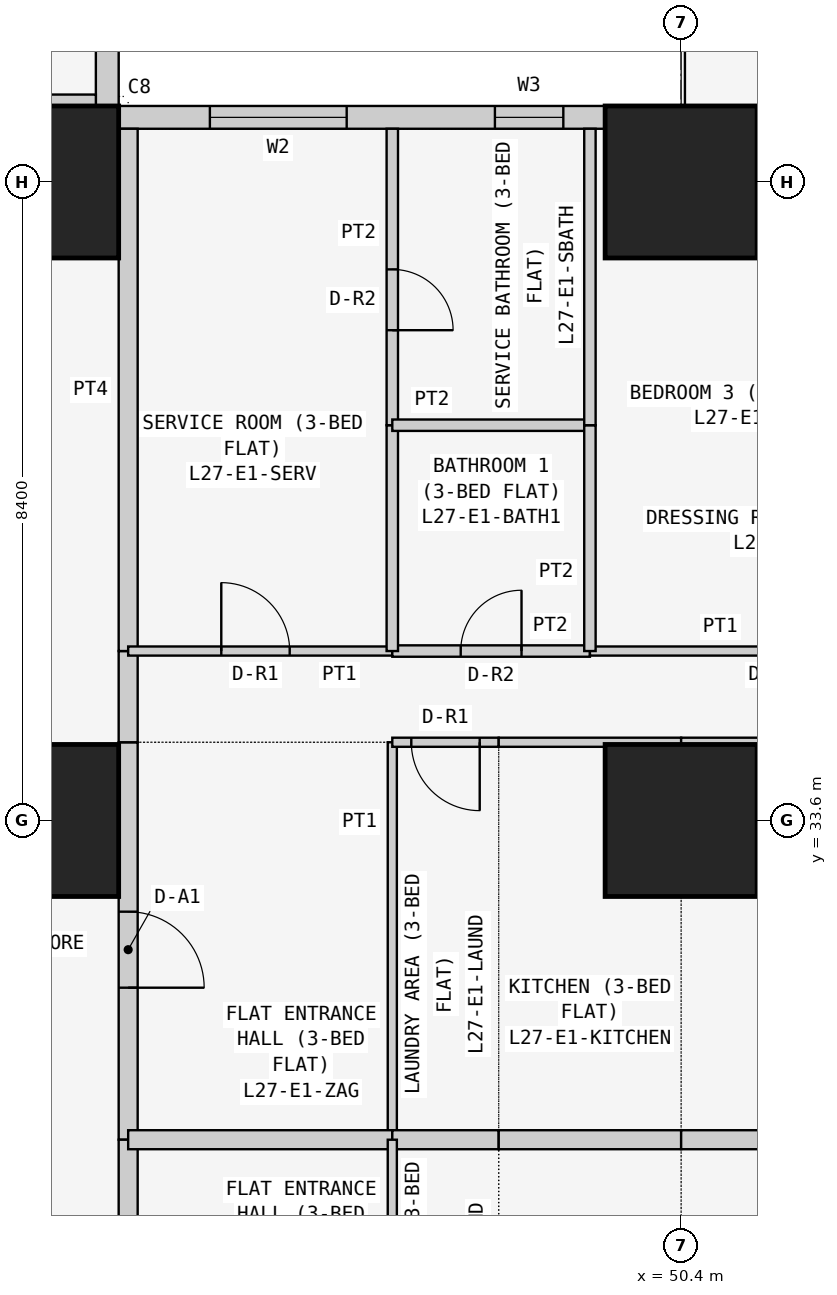
"""IFC4 building model, lengths in metres.
Left out: names, types, materials, properties, quantities, classifications, styles, units other than length and angle.
Written with IfcOpenShell. Run it as: python <this file> out.ifc"""

import sys

from ifc_helpers import new_model, si_unit, direction, frame, frame_2d, origin, origin_2d, place, context, subcontext, project, spatial, rectangle, extrude, element, fill, save


model = new_model("IFC4")
c1 = context("Model", 3, precision=1e-05, world=origin(), true_north=direction((0.0, 1.0)))
c2 = subcontext(c1, "Body", "Model", "MODEL_VIEW")
j1 = project(units=[si_unit("LENGTHUNIT", "METRE"), si_unit("PLANEANGLEUNIT", "RADIAN")], contexts=[c1])
p1 = place(None, origin())
s1 = spatial("IfcSite", under=j1, at=p1, CompositionType="ELEMENT")
p2 = place(p1, origin())
s2 = spatial("IfcBuilding", under=s1, at=p2, CompositionType="ELEMENT")
p3 = place(p2, frame((0.0, 0.0, 108.9)))
s3 = spatial("IfcBuildingStorey", under=s2, at=p3, CompositionType="ELEMENT", Elevation=108.9)
for number, where, z_axis, x_axis in (
    (1, (42.0, 33.6, 0.0), (0.0, 0.0, 1.0), (1.0, 0.0, 0.0)),
    (2, (42.0, 42.0, 0.0), (0.0, 0.0, 1.0), (1.0, 0.0, 0.0)),
    (3, (50.4, 33.6, 0.0), (0.0, 0.0, 1.0), (1.0, 0.0, 0.0)),
    (4, (50.4, 42.0, 0.0), (0.0, 0.0, 1.0), (1.0, 0.0, 0.0)),
):
    element("IfcColumn", number, at=place(p3, frame(where, z_axis=z_axis, x_axis=x_axis)), inside=s3, PredefinedType="COLUMN", context=c2, shape_type="SweptSolid", body=[
        extrude(rectangle(XDim=2.0, YDim=2.0, at=origin_2d()), origin(), (0.0, 0.0, 1.0), 3.6),
    ])
p4 = place(p3, frame((58.4, 42.85, 0.0), z_axis=(0.0, 0.0, 1.0), x_axis=(-1.0, 0.0, 0.0)))
e5 = element("IfcWall", 5, at=p4, inside=s3, PredefinedType="SOLIDWALL", context=c2, shape_type="SweptSolid", body=[
    extrude(rectangle(XDim=15.7, YDim=0.3, at=frame_2d((7.85, 0.0))), origin(), (0.0, 0.0, 1.0), 3.45),
])
p5 = place(p4, frame((12.4, 0.0, 0.9)))
e6 = element("IfcOpeningElement", 6, at=p5, cuts=e5, PredefinedType="OPENING", context=c2, shape_type="SweptSolid", body=[
    extrude(rectangle(XDim=1.8, YDim=1.5, at=frame_2d((0.9, 0.75))), frame((0.0, 0.16, 0.0), z_axis=(0.0, -1.0, 0.0), x_axis=(1.0, 0.0, 0.0)), (0.0, 0.0, 1.0), 0.32),
])
p6 = place(p4, frame((9.55, 0.0, 1.5)))
e7 = element("IfcOpeningElement", 7, at=p6, cuts=e5, PredefinedType="OPENING", context=c2, shape_type="SweptSolid", body=[
    extrude(rectangle(XDim=0.9, YDim=0.7, at=frame_2d((0.45, 0.35))), frame((0.0, 0.16, 0.0), z_axis=(0.0, -1.0, 0.0), x_axis=(1.0, 0.0, 0.0)), (0.0, 0.0, 1.0), 0.32),
])
p7 = place(p4, frame((5.1, 0.0, 0.9)))
e8 = element("IfcOpeningElement", 8, at=p7, cuts=e5, PredefinedType="OPENING", context=c2, shape_type="SweptSolid", body=[
    extrude(rectangle(XDim=1.8, YDim=1.5, at=frame_2d((0.9, 0.75))), frame((0.0, 0.16, 0.0), z_axis=(0.0, -1.0, 0.0), x_axis=(1.0, 0.0, 0.0)), (0.0, 0.0, 1.0), 0.32),
])
p8 = place(p4, frame((2.0, 0.0, 0.0)))
e9 = element("IfcOpeningElement", 9, at=p8, cuts=e5, PredefinedType="OPENING", context=c2, shape_type="SweptSolid", body=[
    extrude(rectangle(XDim=0.9, YDim=2.4, at=frame_2d((0.45, 1.2))), frame((0.0, 0.16, 0.0), z_axis=(0.0, -1.0, 0.0), x_axis=(1.0, 0.0, 0.0)), (0.0, 0.0, 1.0), 0.32),
])
p9 = place(p4, frame((0.7, 0.0, 0.9)))
e10 = element("IfcOpeningElement", 10, at=p9, cuts=e5, PredefinedType="OPENING", context=c2, shape_type="SweptSolid", body=[
    extrude(rectangle(XDim=1.2, YDim=1.5, at=frame_2d((0.6, 0.75))), frame((0.0, 0.16, 0.0), z_axis=(0.0, -1.0, 0.0), x_axis=(1.0, 0.0, 0.0)), (0.0, 0.0, 1.0), 0.32),
])
p10 = place(p3, frame((42.85, 43.0, 0.0), z_axis=(0.0, 0.0, 1.0), x_axis=(0.0, 1.0, 0.0)))
e11 = element("IfcWall", 11, at=p10, inside=s3, PredefinedType="SOLIDWALL", context=c2, shape_type="SweptSolid", body=[
    extrude(rectangle(XDim=7.0, YDim=0.3, at=frame_2d((3.5, 0.0))), origin(), (0.0, 0.0, 1.0), 3.45),
])
p11 = place(p10, frame((1.5, 0.0, 0.9)))
e12 = element("IfcOpeningElement", 12, at=p11, cuts=e11, PredefinedType="OPENING", context=c2, shape_type="SweptSolid", body=[
    extrude(rectangle(XDim=2.4, YDim=1.5, at=frame_2d((1.2, 0.75))), frame((0.0, 0.16, 0.0), z_axis=(0.0, -1.0, 0.0), x_axis=(1.0, 0.0, 0.0)), (0.0, 0.0, 1.0), 0.32),
])
p12 = place(p10, frame((5.05, 0.0, 0.9)))
e13 = element("IfcOpeningElement", 13, at=p12, cuts=e11, PredefinedType="OPENING", context=c2, shape_type="SweptSolid", body=[
    extrude(rectangle(XDim=1.2, YDim=1.5, at=frame_2d((0.6, 0.75))), frame((0.0, 0.16, 0.0), z_axis=(0.0, -1.0, 0.0), x_axis=(1.0, 0.0, 0.0)), (0.0, 0.0, 1.0), 0.32),
])
p13 = place(p3, frame((31.143, 43.075, 0.0), z_axis=(0.0, 0.0, 1.0), x_axis=(1.0, 0.0, 0.0)))
e14 = element("IfcWall", 14, at=p13, inside=s3, PredefinedType="PARTITIONING", context=c2, shape_type="SweptSolid", body=[
    extrude(rectangle(XDim=11.557, YDim=0.15, at=frame_2d((5.778, 0.0))), origin(), (0.0, 0.0, 1.0), 3.45),
])
p14 = place(p3, frame((43.125, 34.629, 0.0), z_axis=(0.0, 0.0, 1.0), x_axis=(0.0, -1.0, 0.0)))
e15 = element("IfcWall", 15, at=p14, inside=s3, PredefinedType="PARTITIONING", context=c2, shape_type="SweptSolid", body=[
    extrude(rectangle(XDim=5.229, YDim=0.25, at=frame_2d((2.615, 0.0))), origin(), (0.0, 0.0, 1.0), 3.45),
])
p15 = place(p14, frame((2.229, 0.0, 0.0)))
e16 = element("IfcOpeningElement", 16, at=p15, cuts=e15, PredefinedType="OPENING", context=c2, shape_type="SweptSolid", body=[
    extrude(rectangle(XDim=1.0, YDim=2.1, at=frame_2d((0.5, 1.05))), frame((0.0, 0.135, 0.0), z_axis=(0.0, -1.0, 0.0), x_axis=(1.0, 0.0, 0.0)), (0.0, 0.0, 1.0), 0.27),
])
p16 = place(p3, frame((43.125, 35.829, 0.0), z_axis=(0.0, 0.0, 1.0), x_axis=(0.0, -1.0, 0.0)))
e17 = element("IfcWall", 17, at=p16, inside=s3, PredefinedType="PARTITIONING", context=c2, shape_type="SweptSolid", body=[
    extrude(rectangle(XDim=1.2, YDim=0.25, at=frame_2d((0.6, 0.0))), origin(), (0.0, 0.0, 1.0), 3.45),
])
p17 = place(p3, frame((43.125, 42.7, 0.0), z_axis=(0.0, 0.0, 1.0), x_axis=(0.0, -1.0, 0.0)))
e18 = element("IfcWall", 18, at=p17, inside=s3, PredefinedType="PARTITIONING", context=c2, shape_type="SweptSolid", body=[
    extrude(rectangle(XDim=6.871, YDim=0.25, at=frame_2d((3.436, 0.0))), origin(), (0.0, 0.0, 1.0), 3.45),
])
p18 = place(p3, frame((43.125, 29.4, 0.0), z_axis=(0.0, 0.0, 1.0), x_axis=(0.0, -1.0, 0.0)))
e19 = element("IfcWall", 19, at=p18, inside=s3, PredefinedType="PARTITIONING", context=c2, shape_type="SweptSolid", body=[
    extrude(rectangle(XDim=5.229, YDim=0.25, at=frame_2d((2.615, 0.0))), origin(), (0.0, 0.0, 1.0), 3.45),
])
p19 = place(p18, frame((2.05, 0.0, 0.0)))
e20 = element("IfcOpeningElement", 20, at=p19, cuts=e19, PredefinedType="OPENING", context=c2, shape_type="SweptSolid", body=[
    extrude(rectangle(XDim=1.0, YDim=2.1, at=frame_2d((0.5, 1.05))), frame((0.0, 0.135, 0.0), z_axis=(0.0, -1.0, 0.0), x_axis=(1.0, 0.0, 0.0)), (0.0, 0.0, 1.0), 0.27),
])
p20 = place(p3, frame((46.6, 29.4, 0.0), z_axis=(0.0, 0.0, 1.0), x_axis=(0.0, 1.0, 0.0)))
e21 = element("IfcWall", 21, at=p20, inside=s3, PredefinedType="PARTITIONING", context=c2, shape_type="SweptSolid", body=[
    extrude(rectangle(XDim=5.229, YDim=0.12, at=frame_2d((2.615, 0.0))), origin(), (0.0, 0.0, 1.0), 3.45),
])
p21 = place(p3, frame((43.125, 29.4, 0.0), z_axis=(0.0, 0.0, 1.0), x_axis=(1.0, 0.0, 0.0)))
e22 = element("IfcWall", 22, at=p21, inside=s3, PredefinedType="PARTITIONING", context=c2, shape_type="SweptSolid", body=[
    extrude(rectangle(XDim=3.475, YDim=0.25, at=frame_2d((1.738, 0.0))), origin(), (0.0, 0.0, 1.0), 3.45),
])
p22 = place(p3, frame((48.0, 34.629, 0.0), z_axis=(0.0, 0.0, 1.0), x_axis=(-1.0, 0.0, 0.0)))
e23 = element("IfcWall", 23, at=p22, inside=s3, PredefinedType="PARTITIONING", context=c2, shape_type="SweptSolid", body=[
    extrude(rectangle(XDim=1.4, YDim=0.12, at=frame_2d((0.7, 0.0))), origin(), (0.0, 0.0, 1.0), 3.45),
])
p23 = place(p22, frame((0.25, 0.0, 0.0)))
e24 = element("IfcOpeningElement", 24, at=p23, cuts=e23, PredefinedType="OPENING", context=c2, shape_type="SweptSolid", body=[
    extrude(rectangle(XDim=0.9, YDim=2.1, at=frame_2d((0.45, 1.05))), frame((0.0, 0.07, 0.0), z_axis=(0.0, -1.0, 0.0), x_axis=(1.0, 0.0, 0.0)), (0.0, 0.0, 1.0), 0.14),
])
p24 = place(p3, frame((46.6, 29.4, 0.0), z_axis=(0.0, 0.0, 1.0), x_axis=(1.0, 0.0, 0.0)))
e25 = element("IfcWall", 25, at=p24, inside=s3, PredefinedType="PARTITIONING", context=c2, shape_type="SweptSolid", body=[
    extrude(rectangle(XDim=1.4, YDim=0.25, at=frame_2d((0.7, 0.0))), origin(), (0.0, 0.0, 1.0), 3.45),
])
p25 = place(p3, frame((50.4, 34.629, 0.0), z_axis=(0.0, 0.0, 1.0), x_axis=(-1.0, 0.0, 0.0)))
e26 = element("IfcWall", 26, at=p25, inside=s3, PredefinedType="PARTITIONING", context=c2, shape_type="SweptSolid", body=[
    extrude(rectangle(XDim=2.4, YDim=0.12, at=frame_2d((1.2, 0.0))), origin(), (0.0, 0.0, 1.0), 3.45),
])
p26 = place(p3, frame((48.0, 29.4, 0.0), z_axis=(0.0, 0.0, 1.0), x_axis=(1.0, 0.0, 0.0)))
e27 = element("IfcWall", 27, at=p26, inside=s3, PredefinedType="PARTITIONING", context=c2, shape_type="SweptSolid", body=[
    extrude(rectangle(XDim=2.4, YDim=0.25, at=frame_2d((1.2, 0.0))), origin(), (0.0, 0.0, 1.0), 3.45),
])
p27 = place(p3, frame((55.3, 34.629, 0.0), z_axis=(0.0, 0.0, 1.0), x_axis=(-1.0, 0.0, 0.0)))
e28 = element("IfcWall", 28, at=p27, inside=s3, PredefinedType="PARTITIONING", context=c2, shape_type="SweptSolid", body=[
    extrude(rectangle(XDim=4.9, YDim=0.12, at=frame_2d((2.45, 0.0))), origin(), (0.0, 0.0, 1.0), 3.45),
])
p28 = place(p27, frame((1.25, 0.0, 0.0)))
e29 = element("IfcOpeningElement", 29, at=p28, cuts=e28, PredefinedType="OPENING", context=c2, shape_type="SweptSolid", body=[
    extrude(rectangle(XDim=0.9, YDim=2.1, at=frame_2d((0.45, 1.05))), frame((0.0, 0.07, 0.0), z_axis=(0.0, -1.0, 0.0), x_axis=(1.0, 0.0, 0.0)), (0.0, 0.0, 1.0), 0.14),
])
p29 = place(p3, frame((50.4, 29.4, 0.0), z_axis=(0.0, 0.0, 1.0), x_axis=(1.0, 0.0, 0.0)))
e30 = element("IfcWall", 30, at=p29, inside=s3, PredefinedType="PARTITIONING", context=c2, shape_type="SweptSolid", body=[
    extrude(rectangle(XDim=9.05, YDim=0.25, at=frame_2d((4.525, 0.0))), origin(), (0.0, 0.0, 1.0), 3.45),
])
p30 = place(p3, frame((46.6, 35.829, 0.0), z_axis=(0.0, 0.0, 1.0), x_axis=(-1.0, 0.0, 0.0)))
e31 = element("IfcWall", 31, at=p30, inside=s3, PredefinedType="PARTITIONING", context=c2, shape_type="SweptSolid", body=[
    extrude(rectangle(XDim=3.475, YDim=0.12, at=frame_2d((1.738, 0.0))), origin(), (0.0, 0.0, 1.0), 3.45),
])
p31 = place(p30, frame((1.35, 0.0, 0.0)))
e32 = element("IfcOpeningElement", 32, at=p31, cuts=e31, PredefinedType="OPENING", context=c2, shape_type="SweptSolid", body=[
    extrude(rectangle(XDim=0.9, YDim=2.1, at=frame_2d((0.45, 1.05))), frame((0.0, 0.07, 0.0), z_axis=(0.0, -1.0, 0.0), x_axis=(1.0, 0.0, 0.0)), (0.0, 0.0, 1.0), 0.14),
])
p32 = place(p3, frame((49.2, 35.829, 0.0), z_axis=(0.0, 0.0, 1.0), x_axis=(-1.0, 0.0, 0.0)))
e33 = element("IfcWall", 33, at=p32, inside=s3, PredefinedType="PARTITIONING", context=c2, shape_type="SweptSolid", body=[
    extrude(rectangle(XDim=2.6, YDim=0.15, at=frame_2d((1.3, 0.0))), origin(), (0.0, 0.0, 1.0), 3.45),
])
p33 = place(p32, frame((0.9, 0.0, 0.0)))
e34 = element("IfcOpeningElement", 34, at=p33, cuts=e33, PredefinedType="OPENING", context=c2, shape_type="SweptSolid", body=[
    extrude(rectangle(XDim=0.8, YDim=2.1, at=frame_2d((0.4, 1.05))), frame((0.0, 0.085, 0.0), z_axis=(0.0, -1.0, 0.0), x_axis=(1.0, 0.0, 0.0)), (0.0, 0.0, 1.0), 0.17),
])
p34 = place(p3, frame((54.1, 35.829, 0.0), z_axis=(0.0, 0.0, 1.0), x_axis=(-1.0, 0.0, 0.0)))
e35 = element("IfcWall", 35, at=p34, inside=s3, PredefinedType="PARTITIONING", context=c2, shape_type="SweptSolid", body=[
    extrude(rectangle(XDim=4.9, YDim=0.12, at=frame_2d((2.45, 0.0))), origin(), (0.0, 0.0, 1.0), 3.45),
])
p35 = place(p34, frame((1.65, 0.0, 0.0)))
e36 = element("IfcOpeningElement", 36, at=p35, cuts=e35, PredefinedType="OPENING", context=c2, shape_type="SweptSolid", body=[
    extrude(rectangle(XDim=0.9, YDim=2.1, at=frame_2d((0.45, 1.05))), frame((0.0, 0.07, 0.0), z_axis=(0.0, -1.0, 0.0), x_axis=(1.0, 0.0, 0.0)), (0.0, 0.0, 1.0), 0.14),
])
p36 = place(p3, frame((46.6, 35.829, 0.0), z_axis=(0.0, 0.0, 1.0), x_axis=(0.0, 1.0, 0.0)))
e37 = element("IfcWall", 37, at=p36, inside=s3, PredefinedType="PARTITIONING", context=c2, shape_type="SweptSolid", body=[
    extrude(rectangle(XDim=2.971, YDim=0.15, at=frame_2d((1.485, 0.0))), origin(), (0.0, 0.0, 1.0), 3.45),
])
p37 = place(p3, frame((46.6, 38.8, 0.0), z_axis=(0.0, 0.0, 1.0), x_axis=(0.0, 1.0, 0.0)))
e38 = element("IfcWall", 38, at=p37, inside=s3, PredefinedType="PARTITIONING", context=c2, shape_type="SweptSolid", body=[
    extrude(rectangle(XDim=3.9, YDim=0.15, at=frame_2d((1.95, 0.0))), origin(), (0.0, 0.0, 1.0), 3.45),
])
p38 = place(p37, frame((1.25, 0.0, 0.0)))
e39 = element("IfcOpeningElement", 39, at=p38, cuts=e38, PredefinedType="OPENING", context=c2, shape_type="SweptSolid", body=[
    extrude(rectangle(XDim=0.8, YDim=2.1, at=frame_2d((0.4, 1.05))), frame((0.0, 0.085, 0.0), z_axis=(0.0, -1.0, 0.0), x_axis=(1.0, 0.0, 0.0)), (0.0, 0.0, 1.0), 0.17),
])
p39 = place(p3, frame((49.2, 38.8, 0.0), z_axis=(0.0, 0.0, 1.0), x_axis=(-1.0, 0.0, 0.0)))
e40 = element("IfcWall", 40, at=p39, inside=s3, PredefinedType="PARTITIONING", context=c2, shape_type="SweptSolid", body=[
    extrude(rectangle(XDim=2.6, YDim=0.15, at=frame_2d((1.3, 0.0))), origin(), (0.0, 0.0, 1.0), 3.45),
])
p40 = place(p3, frame((49.2, 35.829, 0.0), z_axis=(0.0, 0.0, 1.0), x_axis=(0.0, 1.0, 0.0)))
e41 = element("IfcWall", 41, at=p40, inside=s3, PredefinedType="PARTITIONING", context=c2, shape_type="SweptSolid", body=[
    extrude(rectangle(XDim=2.971, YDim=0.15, at=frame_2d((1.485, 0.0))), origin(), (0.0, 0.0, 1.0), 3.45),
])
p41 = place(p3, frame((49.2, 38.8, 0.0), z_axis=(0.0, 0.0, 1.0), x_axis=(0.0, 1.0, 0.0)))
e42 = element("IfcWall", 42, at=p41, inside=s3, PredefinedType="PARTITIONING", context=c2, shape_type="SweptSolid", body=[
    extrude(rectangle(XDim=3.9, YDim=0.15, at=frame_2d((1.95, 0.0))), origin(), (0.0, 0.0, 1.0), 3.45),
])
p42 = place(p3, frame((46.6, 29.4, 0.0), z_axis=(0.0, 0.0, 1.0), x_axis=(0.0, -1.0, 0.0)))
e43 = element("IfcWall", 43, at=p42, inside=s3, PredefinedType="PARTITIONING", context=c2, shape_type="SweptSolid", body=[
    extrude(rectangle(XDim=5.229, YDim=0.12, at=frame_2d((2.615, 0.0))), origin(), (0.0, 0.0, 1.0), 3.45),
])
p43 = place(p5, origin())
e44 = element("IfcWindow", 44, at=p43, inside=s3, PartitioningType="SINGLE_PANEL", PredefinedType="WINDOW", context=c2, shape_type="SweptSolid", body=[
    extrude(rectangle(XDim=1.8, YDim=1.5, at=frame_2d((0.9, 0.75))), frame((0.0, 0.03, 0.0), z_axis=(0.0, -1.0, 0.0), x_axis=(1.0, 0.0, 0.0)), (0.0, 0.0, 1.0), 0.06),
])
fill(e6, e44)
p44 = place(p6, origin())
e45 = element("IfcWindow", 45, at=p44, inside=s3, PartitioningType="SINGLE_PANEL", PredefinedType="WINDOW", context=c2, shape_type="SweptSolid", body=[
    extrude(rectangle(XDim=0.9, YDim=0.7, at=frame_2d((0.45, 0.35))), frame((0.0, 0.03, 0.0), z_axis=(0.0, -1.0, 0.0), x_axis=(1.0, 0.0, 0.0)), (0.0, 0.0, 1.0), 0.06),
])
fill(e7, e45)
p45 = place(p15, origin())
e46 = element("IfcDoor", 46, at=p45, inside=s3, OperationType="SINGLE_SWING_RIGHT", PredefinedType="DOOR", context=c2, shape_type="SweptSolid", body=[
    extrude(rectangle(XDim=1.0, YDim=2.1, at=frame_2d((0.5, 1.05))), frame((0.0, 0.025, 0.0), z_axis=(0.0, -1.0, 0.0), x_axis=(1.0, 0.0, 0.0)), (0.0, 0.0, 1.0), 0.05),
])
fill(e16, e46)
p46 = place(p23, origin())
e47 = element("IfcDoor", 47, at=p46, inside=s3, OperationType="SINGLE_SWING_LEFT", PredefinedType="DOOR", context=c2, shape_type="SweptSolid", body=[
    extrude(rectangle(XDim=0.9, YDim=2.1, at=frame_2d((0.45, 1.05))), frame((0.0, 0.025, 0.0), z_axis=(0.0, -1.0, 0.0), x_axis=(1.0, 0.0, 0.0)), (0.0, 0.0, 1.0), 0.05),
])
fill(e24, e47)
p47 = place(p31, frame((0.9, 0.0, 0.0), z_axis=(0.0, 0.0, 1.0), x_axis=(-1.0, 0.0, 0.0)))
e48 = element("IfcDoor", 48, at=p47, inside=s3, OperationType="SINGLE_SWING_LEFT", PredefinedType="DOOR", context=c2, shape_type="SweptSolid", body=[
    extrude(rectangle(XDim=0.9, YDim=2.1, at=frame_2d((0.45, 1.05))), frame((0.0, 0.025, 0.0), z_axis=(0.0, -1.0, 0.0), x_axis=(1.0, 0.0, 0.0)), (0.0, 0.0, 1.0), 0.05),
])
fill(e32, e48)
p48 = place(p38, frame((0.8, 0.0, 0.0), z_axis=(0.0, 0.0, 1.0), x_axis=(-1.0, 0.0, 0.0)))
e49 = element("IfcDoor", 49, at=p48, inside=s3, OperationType="SINGLE_SWING_RIGHT", PredefinedType="DOOR", context=c2, shape_type="SweptSolid", body=[
    extrude(rectangle(XDim=0.8, YDim=2.1, at=frame_2d((0.4, 1.05))), frame((0.0, 0.025, 0.0), z_axis=(0.0, -1.0, 0.0), x_axis=(1.0, 0.0, 0.0)), (0.0, 0.0, 1.0), 0.05),
])
fill(e39, e49)
p49 = place(p33, frame((0.8, 0.0, 0.0), z_axis=(0.0, 0.0, 1.0), x_axis=(-1.0, 0.0, 0.0)))
e50 = element("IfcDoor", 50, at=p49, inside=s3, OperationType="SINGLE_SWING_RIGHT", PredefinedType="DOOR", context=c2, shape_type="SweptSolid", body=[
    extrude(rectangle(XDim=0.8, YDim=2.1, at=frame_2d((0.4, 1.05))), frame((0.0, 0.025, 0.0), z_axis=(0.0, -1.0, 0.0), x_axis=(1.0, 0.0, 0.0)), (0.0, 0.0, 1.0), 0.05),
])
fill(e34, e50)
save(model, sys.argv[1])
